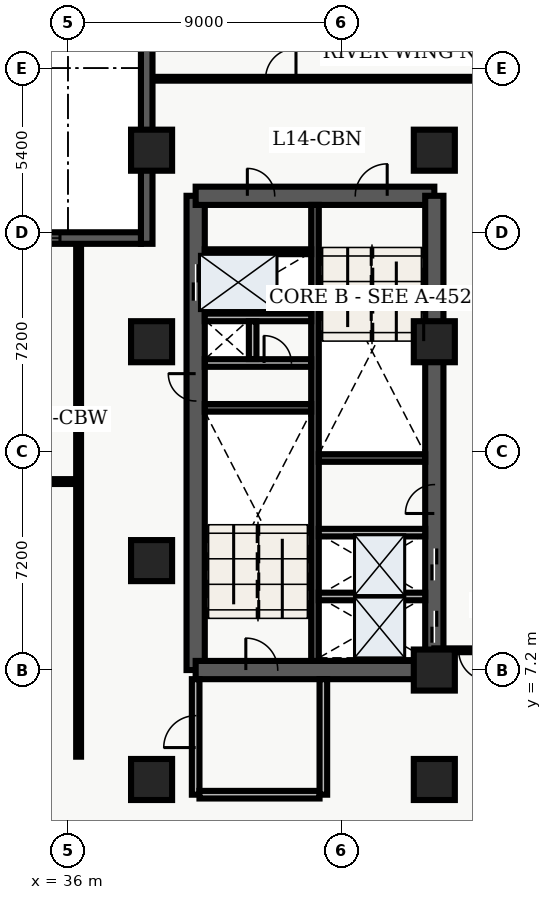
"""IFC4 building model, lengths in metres.
Left out: names, types, materials, properties, quantities, classifications, styles, units other than length and angle.
Written with IfcOpenShell. Run it as: python <this file> out.ifc"""

import sys

from ifc_helpers import new_model, entity, si_unit, converted_unit, direction, frame, origin_with_axes, origin_2d_with_axis, place, context, subcontext, project, spatial, polyline, rectangle, outline, extrude, element, fill, save


model = new_model("IFC4")
c1 = context("Model", 3, precision=1e-05, world=origin_with_axes(), true_north=direction((0.0, 1.0)))
c2 = subcontext(c1, "Body", "Model", "MODEL_VIEW")
j1 = project(units=[si_unit("LENGTHUNIT", "METRE"), converted_unit("PLANEANGLEUNIT", "DEGREE", entity("IfcPlaneAngleMeasure", 0.017), si_unit("PLANEANGLEUNIT", "RADIAN"), dimensions=[0, 0, 0, 0, 0, 0, 0])], contexts=[c1])
p1 = place(None, origin_with_axes())
s1 = spatial("IfcSite", under=j1, at=p1, CompositionType="ELEMENT")
p2 = place(p1, origin_with_axes())
s2 = spatial("IfcBuilding", under=s1, at=p2, CompositionType="ELEMENT")
p3 = place(p2, frame((0.0, 0.0, 60.0), z_axis=(0.0, 0.0, 1.0), x_axis=(1.0, 0.0, 0.0)))
s3 = spatial("IfcBuildingStorey", under=s2, at=p3, CompositionType="ELEMENT", Elevation=60.0)
p4 = place(p3, frame((40.2, 7.2, 0.0), z_axis=(0.0, 0.0, 1.0), x_axis=(0.0, 1.0, 0.0)))
e1 = element("IfcWall", 1, at=p4, inside=s3, PredefinedType="SHEAR", context=c2, shape_type="SweptSolid", body=[
    extrude(outline(polyline([(0.0, -0.3), (15.6, -0.3), (15.6, 0.3), (0.0, 0.3), (0.0, -0.3)])), origin_with_axes(), (0.0, 0.0, 1.0), 3.66),
])
p5 = place(p4, frame((12.75, 0.0, 0.0), z_axis=(0.0, 0.0, 1.0), x_axis=(1.0, 0.0, 0.0)))
e2 = element("IfcOpeningElement", 2, at=p5, cuts=e1, PredefinedType="OPENING", context=c2, shape_type="SweptSolid", body=[
    extrude(rectangle(XDim=1.2, YDim=0.62, at=origin_2d_with_axis()), origin_with_axes(), (0.0, 0.0, 1.0), 2.15),
])
p6 = place(p4, frame((9.3, 0.0, 0.0), z_axis=(0.0, 0.0, 1.0), x_axis=(1.0, 0.0, 0.0)))
e3 = element("IfcOpeningElement", 3, at=p6, cuts=e1, PredefinedType="OPENING", context=c2, shape_type="SweptSolid", body=[
    extrude(rectangle(XDim=0.9, YDim=0.62, at=origin_2d_with_axis()), origin_with_axes(), (0.0, 0.0, 1.0), 2.15),
])
p7 = place(p3, frame((40.2, 7.2, 0.0), z_axis=(0.0, 0.0, 1.0), x_axis=(1.0, 0.0, 0.0)))
e4 = element("IfcWall", 4, at=p7, inside=s3, PredefinedType="SHEAR", context=c2, shape_type="SweptSolid", body=[
    extrude(outline(polyline([(0.0, -0.3), (7.85, -0.3), (7.85, 0.3), (0.0, 0.3), (0.0, -0.3)])), origin_with_axes(), (0.0, 0.0, 1.0), 3.66),
])
p8 = place(p7, frame((2.175, 0.0, 0.0), z_axis=(0.0, 0.0, 1.0), x_axis=(1.0, 0.0, 0.0)))
e5 = element("IfcOpeningElement", 5, at=p8, cuts=e4, PredefinedType="OPENING", context=c2, shape_type="SweptSolid", body=[
    extrude(rectangle(XDim=1.05, YDim=0.62, at=origin_2d_with_axis()), origin_with_axes(), (0.0, 0.0, 1.0), 2.15),
])
p9 = place(p3, frame((40.2, 22.8, 0.0), z_axis=(0.0, 0.0, 1.0), x_axis=(1.0, 0.0, 0.0)))
e6 = element("IfcWall", 6, at=p9, inside=s3, PredefinedType="SHEAR", context=c2, shape_type="SweptSolid", body=[
    extrude(outline(polyline([(0.0, -0.3), (7.85, -0.3), (7.85, 0.3), (0.0, 0.3), (0.0, -0.3)])), origin_with_axes(), (0.0, 0.0, 1.0), 3.66),
])
p10 = place(p9, frame((5.775, 0.0, 0.0), z_axis=(0.0, 0.0, 1.0), x_axis=(1.0, 0.0, 0.0)))
e7 = element("IfcOpeningElement", 7, at=p10, cuts=e6, PredefinedType="OPENING", context=c2, shape_type="SweptSolid", body=[
    extrude(rectangle(XDim=1.05, YDim=0.62, at=origin_2d_with_axis()), origin_with_axes(), (0.0, 0.0, 1.0), 2.15),
])
p11 = place(p9, frame((2.15, 0.0, 0.0), z_axis=(0.0, 0.0, 1.0), x_axis=(1.0, 0.0, 0.0)))
e8 = element("IfcOpeningElement", 8, at=p11, cuts=e6, PredefinedType="OPENING", context=c2, shape_type="SweptSolid", body=[
    extrude(rectangle(XDim=0.9, YDim=0.62, at=origin_2d_with_axis()), origin_with_axes(), (0.0, 0.0, 1.0), 2.15),
])
p12 = place(p3, frame((48.05, 7.2, 0.0), z_axis=(0.0, 0.0, 1.0), x_axis=(0.0, 1.0, 0.0)))
e9 = element("IfcWall", 9, at=p12, inside=s3, PredefinedType="SHEAR", context=c2, shape_type="SweptSolid", body=[
    extrude(outline(polyline([(0.0, -0.3), (15.6, -0.3), (15.6, 0.3), (0.0, 0.3), (0.0, -0.3)])), origin_with_axes(), (0.0, 0.0, 1.0), 3.66),
])
p13 = place(p12, frame((1.425, 0.0, 0.0), z_axis=(0.0, 0.0, 1.0), x_axis=(1.0, 0.0, 0.0)))
e10 = element("IfcOpeningElement", 10, at=p13, cuts=e9, PredefinedType="OPENING", context=c2, shape_type="SweptSolid", body=[
    extrude(rectangle(XDim=1.05, YDim=0.62, at=origin_2d_with_axis()), origin_with_axes(), (0.0, 0.0, 1.0), 2.15),
])
p14 = place(p12, frame((3.475, 0.0, 0.0), z_axis=(0.0, 0.0, 1.0), x_axis=(1.0, 0.0, 0.0)))
e11 = element("IfcOpeningElement", 11, at=p14, cuts=e9, PredefinedType="OPENING", context=c2, shape_type="SweptSolid", body=[
    extrude(rectangle(XDim=1.05, YDim=0.62, at=origin_2d_with_axis()), origin_with_axes(), (0.0, 0.0, 1.0), 2.15),
])
p15 = place(p12, frame((5.625, 0.0, 0.0), z_axis=(0.0, 0.0, 1.0), x_axis=(1.0, 0.0, 0.0)))
e12 = element("IfcOpeningElement", 12, at=p15, cuts=e9, PredefinedType="OPENING", context=c2, shape_type="SweptSolid", body=[
    extrude(rectangle(XDim=0.95, YDim=0.62, at=origin_2d_with_axis()), origin_with_axes(), (0.0, 0.0, 1.0), 2.15),
])
p16 = place(p3, frame((44.125, 7.5, 0.0), z_axis=(0.0, 0.0, 1.0), x_axis=(0.0, 1.0, 0.0)))
e13 = element("IfcWall", 13, at=p16, inside=s3, PredefinedType="SHEAR", context=c2, shape_type="SweptSolid", body=[
    extrude(outline(polyline([(0.0, -0.125), (15.0, -0.125), (15.0, 0.125), (0.0, 0.125), (0.0, -0.125)])), origin_with_axes(), (0.0, 0.0, 1.0), 3.66),
])
for number, where, z_axis, x_axis in (
    (14, (40.5, 15.825, 0.0), (0.0, 0.0, 1.0), (1.0, 0.0, 0.0)),
    (15, (44.25, 14.175, 0.0), (0.0, 0.0, 1.0), (1.0, 0.0, 0.0)),
):
    element("IfcWall", number, at=place(p3, frame(where, z_axis=z_axis, x_axis=x_axis)), inside=s3, PredefinedType="SHEAR", context=c2, shape_type="SweptSolid", body=[
        extrude(outline(polyline([(0.0, -0.125), (3.5, -0.125), (3.5, 0.125), (0.0, 0.125), (0.0, -0.125)])), origin_with_axes(), (0.0, 0.0, 1.0), 3.66),
    ])
p17 = place(p3, frame((40.5, 17.3, 0.0), z_axis=(0.0, 0.0, 1.0), x_axis=(1.0, 0.0, 0.0)))
e16 = element("IfcWall", 16, at=p17, inside=s3, PredefinedType="SOLIDWALL", context=c2, shape_type="SweptSolid", body=[
    extrude(outline(polyline([(0.0, -0.125), (3.5, -0.125), (3.5, 0.125), (0.0, 0.125), (0.0, -0.125)])), origin_with_axes(), (0.0, 0.0, 1.0), 2.7),
])
p18 = place(p17, frame((2.4, 0.0, 0.0), z_axis=(0.0, 0.0, 1.0), x_axis=(1.0, 0.0, 0.0)))
e17 = element("IfcOpeningElement", 17, at=p18, cuts=e16, PredefinedType="OPENING", context=c2, shape_type="SweptSolid", body=[
    extrude(rectangle(XDim=0.9, YDim=0.27, at=origin_2d_with_axis()), origin_with_axes(), (0.0, 0.0, 1.0), 2.15),
])
p19 = place(p3, frame((40.5, 18.8, 0.0), z_axis=(0.0, 0.0, 1.0), x_axis=(1.0, 0.0, 0.0)))
e18 = element("IfcWall", 18, at=p19, inside=s3, PredefinedType="SOLIDWALL", context=c2, shape_type="SweptSolid", body=[
    extrude(outline(polyline([(0.0, -0.125), (3.5, -0.125), (3.5, 0.125), (0.0, 0.125), (0.0, -0.125)])), origin_with_axes(), (0.0, 0.0, 1.0), 2.7),
])
p20 = place(p3, frame((42.075, 17.43, 0.0), z_axis=(0.0, 0.0, 1.0), x_axis=(0.0, 1.0, 0.0)))
e19 = element("IfcWall", 19, at=p20, inside=s3, PredefinedType="SOLIDWALL", context=c2, shape_type="SweptSolid", body=[
    extrude(outline(polyline([(0.0, -0.125), (1.24, -0.125), (1.24, 0.125), (0.0, 0.125), (0.0, -0.125)])), origin_with_axes(), (0.0, 0.0, 1.0), 2.7),
])
p21 = place(p3, frame((40.2, 3.1, 0.0), z_axis=(0.0, 0.0, 1.0), x_axis=(0.0, 1.0, 0.0)))
e20 = element("IfcWall", 20, at=p21, inside=s3, PredefinedType="SOLIDWALL", context=c2, shape_type="SweptSolid", body=[
    extrude(outline(polyline([(0.0, -0.125), (3.8, -0.125), (3.8, 0.125), (0.0, 0.125), (0.0, -0.125)])), origin_with_axes(), (0.0, 0.0, 1.0), 2.7),
])
p22 = place(p21, frame((2.075, 0.0, 0.0), z_axis=(0.0, 0.0, 1.0), x_axis=(1.0, 0.0, 0.0)))
e21 = element("IfcOpeningElement", 21, at=p22, cuts=e20, PredefinedType="OPENING", context=c2, shape_type="SweptSolid", body=[
    extrude(rectangle(XDim=1.05, YDim=0.27, at=origin_2d_with_axis()), origin_with_axes(), (0.0, 0.0, 1.0), 2.15),
])
p23 = place(p3, frame((40.325, 3.1, 0.0), z_axis=(0.0, 0.0, 1.0), x_axis=(1.0, 0.0, 0.0)))
e22 = element("IfcWall", 22, at=p23, inside=s3, PredefinedType="SOLIDWALL", context=c2, shape_type="SweptSolid", body=[
    extrude(outline(polyline([(0.0, -0.125), (3.95, -0.125), (3.95, 0.125), (0.0, 0.125), (0.0, -0.125)])), origin_with_axes(), (0.0, 0.0, 1.0), 2.7),
])
p24 = place(p3, frame((44.4, 3.1, 0.0), z_axis=(0.0, 0.0, 1.0), x_axis=(0.0, 1.0, 0.0)))
e23 = element("IfcWall", 23, at=p24, inside=s3, PredefinedType="SOLIDWALL", context=c2, shape_type="SweptSolid", body=[
    extrude(outline(polyline([(0.0, -0.125), (3.8, -0.125), (3.8, 0.125), (0.0, 0.125), (0.0, -0.125)])), origin_with_axes(), (0.0, 0.0, 1.0), 2.7),
])
for number, where, z_axis, x_axis in (
    (24, (38.75, 3.6, 0.0), (0.0, 0.0, 1.0), (1.0, 0.0, 0.0)),
    (25, (38.75, 10.8, 0.0), (0.0, 0.0, 1.0), (1.0, 0.0, 0.0)),
    (26, (38.75, 18.0, 0.0), (0.0, 0.0, 1.0), (1.0, 0.0, 0.0)),
    (27, (38.75, 24.3, 0.0), (0.0, 0.0, 1.0), (1.0, 0.0, 0.0)),
    (28, (48.05, 3.6, 0.0), (0.0, 0.0, 1.0), (1.0, 0.0, 0.0)),
    (29, (48.05, 7.2, 0.0), (0.0, 0.0, 1.0), (1.0, 0.0, 0.0)),
    (30, (48.05, 18.0, 0.0), (0.0, 0.0, 1.0), (1.0, 0.0, 0.0)),
    (31, (48.05, 24.3, 0.0), (0.0, 0.0, 1.0), (1.0, 0.0, 0.0)),
):
    element("IfcColumn", number, at=place(p3, frame(where, z_axis=z_axis, x_axis=x_axis)), inside=s3, PredefinedType="COLUMN", context=c2, shape_type="SweptSolid", body=[
        extrude(rectangle(XDim=1.35, YDim=1.35, at=origin_2d_with_axis()), origin_with_axes(), (0.0, 0.0, 1.0), 3.9),
    ])
p25 = place(p3, frame((40.5, 20.96, 0.0), z_axis=(0.0, 0.0, 1.0), x_axis=(1.0, 0.0, 0.0)))
e32 = element("IfcWall", 32, at=p25, inside=s3, PredefinedType="PARTITIONING", context=c2, shape_type="SweptSolid", body=[
    extrude(outline(polyline([(0.0, -0.08), (3.5, -0.08), (3.5, 0.08), (0.0, 0.08), (0.0, -0.08)])), origin_with_axes(), (0.0, 0.0, 1.0), 2.7),
])
for number, where, z_axis, x_axis in (
    (33, (44.25, 9.62, 0.0), (0.0, 0.0, 1.0), (1.0, 0.0, 0.0)),
    (34, (44.25, 11.72, 0.0), (0.0, 0.0, 1.0), (1.0, 0.0, 0.0)),
):
    element("IfcWall", number, at=place(p3, frame(where, z_axis=z_axis, x_axis=x_axis)), inside=s3, PredefinedType="SOLIDWALL", context=c2, shape_type="SweptSolid", body=[
        extrude(outline(polyline([(0.0, -0.125), (3.5, -0.125), (3.5, 0.125), (0.0, 0.125), (0.0, -0.125)])), origin_with_axes(), (0.0, 0.0, 1.0), 2.7),
    ])
p26 = place(p3, frame((21.15, 13.4, 0.0), z_axis=(0.0, 0.0, 1.0), x_axis=(1.0, 0.0, 0.0)))
e35 = element("IfcWall", 35, at=p26, inside=s3, PredefinedType="PARTITIONING", context=c2, shape_type="SweptSolid", body=[
    extrude(outline(polyline([(0.0, -0.08), (15.2, -0.08), (15.2, 0.08), (0.0, 0.08), (0.0, -0.08)])), origin_with_axes(), (0.0, 0.0, 1.0), 2.7),
])
p27 = place(p26, frame((2.829, 0.0, 0.0), z_axis=(0.0, 0.0, 1.0), x_axis=(1.0, 0.0, 0.0)))
e36 = element("IfcOpeningElement", 36, at=p27, cuts=e35, PredefinedType="OPENING", context=c2, shape_type="SweptSolid", body=[
    extrude(rectangle(XDim=1.0, YDim=0.18, at=origin_2d_with_axis()), origin_with_axes(), (0.0, 0.0, 1.0), 2.15),
])
p28 = place(p26, frame((8.536, 0.0, 0.0), z_axis=(0.0, 0.0, 1.0), x_axis=(1.0, 0.0, 0.0)))
e37 = element("IfcOpeningElement", 37, at=p28, cuts=e35, PredefinedType="OPENING", context=c2, shape_type="SweptSolid", body=[
    extrude(rectangle(XDim=1.2, YDim=0.18, at=origin_2d_with_axis()), origin_with_axes(), (0.0, 0.0, 1.0), 2.2),
])
p29 = place(p26, frame((13.076, 0.0, 0.0), z_axis=(0.0, 0.0, 1.0), x_axis=(1.0, 0.0, 0.0)))
e38 = element("IfcOpeningElement", 38, at=p29, cuts=e35, PredefinedType="OPENING", context=c2, shape_type="SweptSolid", body=[
    extrude(rectangle(XDim=1.0, YDim=0.18, at=origin_2d_with_axis()), origin_with_axes(), (0.0, 0.0, 1.0), 2.15),
])
p30 = place(p3, frame((21.15, 15.7, 0.0), z_axis=(0.0, 0.0, 1.0), x_axis=(1.0, 0.0, 0.0)))
e39 = element("IfcWall", 39, at=p30, inside=s3, PredefinedType="PARTITIONING", context=c2, shape_type="SweptSolid", body=[
    extrude(outline(polyline([(0.0, -0.08), (15.2, -0.08), (15.2, 0.08), (0.0, 0.08), (0.0, -0.08)])), origin_with_axes(), (0.0, 0.0, 1.0), 2.7),
])
p31 = place(p30, frame((3.468, 0.0, 0.0), z_axis=(0.0, 0.0, 1.0), x_axis=(1.0, 0.0, 0.0)))
e40 = element("IfcOpeningElement", 40, at=p31, cuts=e39, PredefinedType="OPENING", context=c2, shape_type="SweptSolid", body=[
    extrude(rectangle(XDim=1.0, YDim=0.18, at=origin_2d_with_axis()), origin_with_axes(), (0.0, 0.0, 1.0), 2.15),
])
p32 = place(p30, frame((10.938, 0.0, 0.0), z_axis=(0.0, 0.0, 1.0), x_axis=(1.0, 0.0, 0.0)))
e41 = element("IfcOpeningElement", 41, at=p32, cuts=e39, PredefinedType="OPENING", context=c2, shape_type="SweptSolid", body=[
    extrude(rectangle(XDim=1.0, YDim=0.18, at=origin_2d_with_axis()), origin_with_axes(), (0.0, 0.0, 1.0), 2.15),
])
p33 = place(p3, frame((36.35, 4.35, 0.0), z_axis=(0.0, 0.0, 1.0), x_axis=(0.0, 1.0, 0.0)))
e42 = element("IfcWall", 42, at=p33, inside=s3, PredefinedType="PARTITIONING", context=c2, shape_type="SweptSolid", body=[
    extrude(outline(polyline([(0.0, -0.08), (16.95, -0.08), (16.95, 0.08), (0.0, 0.08), (0.0, -0.08)])), origin_with_axes(), (0.0, 0.0, 1.0), 2.7),
])
p34 = place(p3, frame((59.64, 7.85, 0.0), z_axis=(0.0, 0.0, 1.0), x_axis=(-1.0, 0.0, 0.0)))
e43 = element("IfcWall", 43, at=p34, inside=s3, PredefinedType="PARTITIONING", context=c2, shape_type="SweptSolid", body=[
    extrude(outline(polyline([(0.0, -0.062), (11.59, -0.062), (11.59, 0.062), (0.0, 0.062), (0.0, -0.062)])), origin_with_axes(), (0.0, 0.0, 1.0), 2.7),
])
p35 = place(p34, frame((10.29, 0.0, 0.0), z_axis=(0.0, 0.0, 1.0), x_axis=(1.0, 0.0, 0.0)))
e44 = element("IfcOpeningElement", 44, at=p35, cuts=e43, PredefinedType="OPENING", context=c2, shape_type="SweptSolid", body=[
    extrude(rectangle(XDim=1.0, YDim=0.145, at=origin_2d_with_axis()), origin_with_axes(), (0.0, 0.0, 1.0), 2.15),
])
p36 = place(p3, frame((38.76, 26.65, 0.0), z_axis=(0.0, 0.0, 1.0), x_axis=(1.0, 0.0, 0.0)))
e45 = element("IfcWall", 45, at=p36, inside=s3, PredefinedType="PARTITIONING", context=c2, shape_type="SweptSolid", body=[
    extrude(outline(polyline([(0.0, -0.062), (20.88, -0.062), (20.88, 0.062), (0.0, 0.062), (0.0, -0.062)])), origin_with_axes(), (0.0, 0.0, 1.0), 2.7),
])
p37 = place(p36, frame((4.24, 0.0, 0.0), z_axis=(0.0, 0.0, 1.0), x_axis=(1.0, 0.0, 0.0)))
e46 = element("IfcOpeningElement", 46, at=p37, cuts=e45, PredefinedType="OPENING", context=c2, shape_type="SweptSolid", body=[
    extrude(rectangle(XDim=1.0, YDim=0.145, at=origin_2d_with_axis()), origin_with_axes(), (0.0, 0.0, 1.0), 2.15),
])
p38 = place(p3, frame((38.59, 21.22, 0.0), z_axis=(0.0, 0.0, 1.0), x_axis=(0.0, 1.0, 0.0)))
e47 = element("IfcWall", 47, at=p38, inside=s3, PredefinedType="SOLIDWALL", context=c2, shape_type="SweptSolid", body=[
    extrude(outline(polyline([(0.0, -0.19), (7.58, -0.19), (7.58, 0.19), (0.0, 0.19), (0.0, -0.19)])), origin_with_axes(), (0.0, 0.0, 1.0), 3.66),
])
p39 = place(p3, frame((21.22, 21.41, 0.0), z_axis=(0.0, 0.0, 1.0), x_axis=(1.0, 0.0, 0.0)))
e48 = element("IfcWall", 48, at=p39, inside=s3, PredefinedType="SOLIDWALL", context=c2, shape_type="SweptSolid", body=[
    extrude(outline(polyline([(0.0, -0.19), (17.18, -0.19), (17.18, 0.19), (0.0, 0.19), (0.0, -0.19)])), origin_with_axes(), (0.0, 0.0, 1.0), 3.66),
])
p40 = place(p39, frame((3.263, 0.0, 0.45), z_axis=(0.0, 0.0, 1.0), x_axis=(1.0, 0.0, 0.0)))
e49 = element("IfcOpeningElement", 49, at=p40, cuts=e48, PredefinedType="OPENING", context=c2, shape_type="SweptSolid", body=[
    extrude(rectangle(XDim=2.1, YDim=0.4, at=origin_2d_with_axis()), origin_with_axes(), (0.0, 0.0, 1.0), 2.2),
])
p41 = place(p39, frame((8.59, 0.0, 0.45), z_axis=(0.0, 0.0, 1.0), x_axis=(1.0, 0.0, 0.0)))
e50 = element("IfcOpeningElement", 50, at=p41, cuts=e48, PredefinedType="OPENING", context=c2, shape_type="SweptSolid", body=[
    extrude(rectangle(XDim=2.1, YDim=0.4, at=origin_2d_with_axis()), origin_with_axes(), (0.0, 0.0, 1.0), 2.2),
])
p42 = place(p39, frame((13.467, 0.0, 0.45), z_axis=(0.0, 0.0, 1.0), x_axis=(1.0, 0.0, 0.0)))
e51 = element("IfcOpeningElement", 51, at=p42, cuts=e48, PredefinedType="OPENING", context=c2, shape_type="SweptSolid", body=[
    extrude(rectangle(XDim=2.1, YDim=0.4, at=origin_2d_with_axis()), origin_with_axes(), (0.0, 0.0, 1.0), 2.2),
])
p43 = place(p12, frame((1.425, 0.0, 0.0), z_axis=(0.0, 0.0, 1.0), x_axis=(1.0, 0.0, 0.0)))
e52 = element("IfcDoor", 52, at=p43, inside=s3, OperationType="SLIDING_TO_LEFT", PredefinedType="DOOR", context=c2, shape_type="SweptSolid", body=[
    extrude(rectangle(XDim=1.05, YDim=0.09, at=origin_2d_with_axis()), origin_with_axes(), (0.0, 0.0, 1.0), 2.15),
])
fill(e10, e52)
p44 = place(p12, frame((3.475, 0.0, 0.0), z_axis=(0.0, 0.0, 1.0), x_axis=(1.0, 0.0, 0.0)))
e53 = element("IfcDoor", 53, at=p44, inside=s3, OperationType="SLIDING_TO_RIGHT", PredefinedType="DOOR", context=c2, shape_type="SweptSolid", body=[
    extrude(rectangle(XDim=1.05, YDim=0.09, at=origin_2d_with_axis()), origin_with_axes(), (0.0, 0.0, 1.0), 2.15),
])
fill(e11, e53)
p45 = place(p4, frame((12.75, 0.0, 0.0), z_axis=(0.0, 0.0, 1.0), x_axis=(1.0, 0.0, 0.0)))
e54 = element("IfcDoor", 54, at=p45, inside=s3, OperationType="DOUBLE_DOOR_SLIDING", PredefinedType="DOOR", context=c2, shape_type="SweptSolid", body=[
    extrude(rectangle(XDim=1.2, YDim=0.09, at=origin_2d_with_axis()), origin_with_axes(), (0.0, 0.0, 1.0), 2.15),
])
fill(e2, e54)
p46 = place(p4, frame((9.3, 0.0, 0.0), z_axis=(0.0, 0.0, 1.0), x_axis=(1.0, 0.0, 0.0)))
e55 = element("IfcDoor", 55, at=p46, inside=s3, OperationType="SINGLE_SWING_RIGHT", PredefinedType="DOOR", context=c2, shape_type="SweptSolid", body=[
    extrude(rectangle(XDim=0.9, YDim=0.09, at=origin_2d_with_axis()), origin_with_axes(), (0.0, 0.0, 1.0), 2.15),
])
fill(e3, e55)
p47 = place(p17, frame((2.4, 0.0, 0.0), z_axis=(0.0, 0.0, 1.0), x_axis=(1.0, 0.0, 0.0)))
e56 = element("IfcDoor", 56, at=p47, inside=s3, OperationType="SINGLE_SWING_LEFT", PredefinedType="DOOR", context=c2, shape_type="SweptSolid", body=[
    extrude(rectangle(XDim=0.9, YDim=0.09, at=origin_2d_with_axis()), origin_with_axes(), (0.0, 0.0, 1.0), 2.15),
])
fill(e17, e56)
p48 = place(p7, frame((2.175, 0.0, 0.0), z_axis=(0.0, 0.0, 1.0), x_axis=(1.0, 0.0, 0.0)))
e57 = element("IfcDoor", 57, at=p48, inside=s3, OperationType="SINGLE_SWING_LEFT", PredefinedType="DOOR", context=c2, shape_type="SweptSolid", body=[
    extrude(rectangle(XDim=1.05, YDim=0.09, at=origin_2d_with_axis()), origin_with_axes(), (0.0, 0.0, 1.0), 2.15),
])
fill(e5, e57)
p49 = place(p9, frame((5.775, 0.0, 0.0), z_axis=(0.0, 0.0, 1.0), x_axis=(1.0, 0.0, 0.0)))
e58 = element("IfcDoor", 58, at=p49, inside=s3, OperationType="SINGLE_SWING_RIGHT", PredefinedType="DOOR", context=c2, shape_type="SweptSolid", body=[
    extrude(rectangle(XDim=1.05, YDim=0.09, at=origin_2d_with_axis()), origin_with_axes(), (0.0, 0.0, 1.0), 2.15),
])
fill(e7, e58)
p50 = place(p21, frame((2.075, 0.0, 0.0), z_axis=(0.0, 0.0, 1.0), x_axis=(1.0, 0.0, 0.0)))
e59 = element("IfcDoor", 59, at=p50, inside=s3, OperationType="SINGLE_SWING_LEFT", PredefinedType="DOOR", context=c2, shape_type="SweptSolid", body=[
    extrude(rectangle(XDim=1.05, YDim=0.09, at=origin_2d_with_axis()), origin_with_axes(), (0.0, 0.0, 1.0), 2.15),
])
fill(e21, e59)
p51 = place(p9, frame((2.15, 0.0, 0.0), z_axis=(0.0, 0.0, 1.0), x_axis=(1.0, 0.0, 0.0)))
e60 = element("IfcDoor", 60, at=p51, inside=s3, OperationType="SINGLE_SWING_LEFT", PredefinedType="DOOR", context=c2, shape_type="SweptSolid", body=[
    extrude(rectangle(XDim=0.9, YDim=0.09, at=origin_2d_with_axis()), origin_with_axes(), (0.0, 0.0, 1.0), 2.15),
])
fill(e8, e60)
p52 = place(p12, frame((5.625, 0.0, 0.0), z_axis=(0.0, 0.0, 1.0), x_axis=(1.0, 0.0, 0.0)))
e61 = element("IfcDoor", 61, at=p52, inside=s3, OperationType="SINGLE_SWING_LEFT", PredefinedType="DOOR", context=c2, shape_type="SweptSolid", body=[
    extrude(rectangle(XDim=0.95, YDim=0.09, at=origin_2d_with_axis()), origin_with_axes(), (0.0, 0.0, 1.0), 2.15),
])
fill(e12, e61)
p53 = place(p34, frame((10.29, 0.0, 0.0), z_axis=(0.0, 0.0, 1.0), x_axis=(1.0, 0.0, 0.0)))
e62 = element("IfcDoor", 62, at=p53, inside=s3, OperationType="SINGLE_SWING_LEFT", PredefinedType="DOOR", context=c2, shape_type="SweptSolid", body=[
    extrude(rectangle(XDim=1.0, YDim=0.075, at=origin_2d_with_axis()), origin_with_axes(), (0.0, 0.0, 1.0), 2.15),
])
fill(e44, e62)
p54 = place(p36, frame((4.24, 0.0, 0.0), z_axis=(0.0, 0.0, 1.0), x_axis=(1.0, 0.0, 0.0)))
e63 = element("IfcDoor", 63, at=p54, inside=s3, OperationType="SINGLE_SWING_RIGHT", PredefinedType="DOOR", context=c2, shape_type="SweptSolid", body=[
    extrude(rectangle(XDim=1.0, YDim=0.075, at=origin_2d_with_axis()), origin_with_axes(), (0.0, 0.0, 1.0), 2.15),
])
fill(e46, e63)
p55 = place(p39, frame((13.467, 0.0, 0.45), z_axis=(0.0, 0.0, 1.0), x_axis=(1.0, 0.0, 0.0)))
e64 = element("IfcWindow", 64, at=p55, inside=s3, PredefinedType="WINDOW", context=c2, shape_type="SweptSolid", body=[
    extrude(rectangle(XDim=2.1, YDim=0.09, at=origin_2d_with_axis()), origin_with_axes(), (0.0, 0.0, 1.0), 2.2),
])
fill(e51, e64)
save(model, sys.argv[1])
